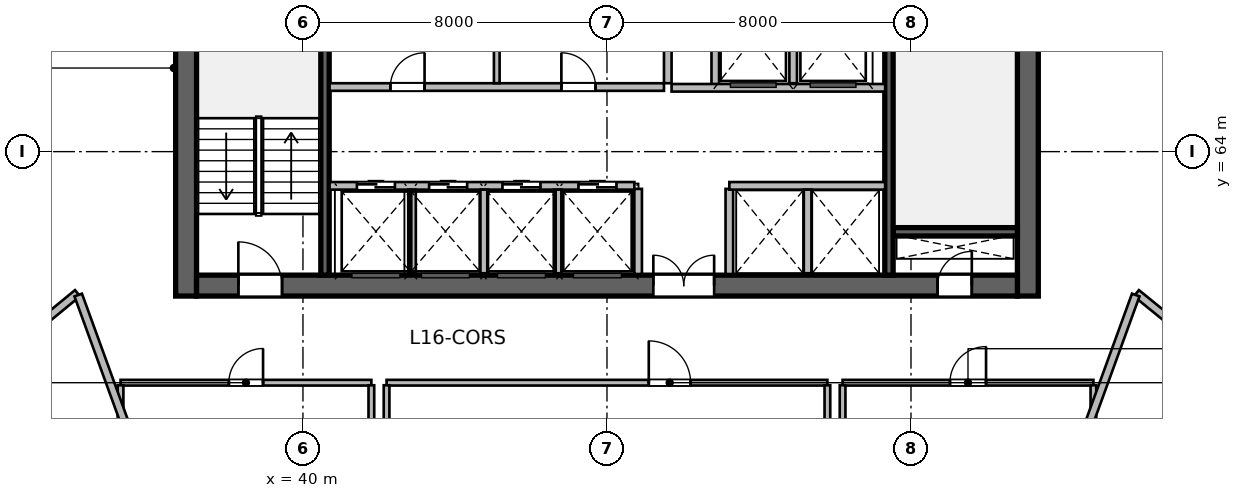
"""IFC4 building model, lengths in metres.
Left out: names, types, materials, properties, quantities, classifications, styles, units other than length and angle.
Written with IfcOpenShell. Run it as: python <this file> out.ifc"""

import sys

from ifc_helpers import new_model, si_unit, direction, frame, frame_2d, origin, place, context, subcontext, project, spatial, rectangle, extrude, source, transform, mapped, element, fill, save


model = new_model("IFC4")
c1 = context("Model", 3, precision=1e-05, world=origin(), true_north=direction((0.0, 1.0)))
c2 = subcontext(c1, "Body", "Model", "MODEL_VIEW")
j1 = project(units=[si_unit("LENGTHUNIT", "METRE"), si_unit("PLANEANGLEUNIT", "RADIAN")], contexts=[c1])
p1 = place(None, origin())
s1 = spatial("IfcSite", under=j1, at=p1, CompositionType="ELEMENT")
p2 = place(p1, origin())
s2 = spatial("IfcBuilding", under=s1, at=p2, CompositionType="ELEMENT")
p3 = place(p2, frame((0.0, 0.0, 71.4)))
s3 = spatial("IfcBuildingStorey", under=s2, at=p3, CompositionType="ELEMENT", Elevation=71.4)
m1 = source(origin(), c2, "Body", "SweptSolid", [
    extrude(rectangle(XDim=12.0, YDim=0.55, at=frame_2d((6.0, 0.0))), origin(), (0.0, 0.0, 1.0), 3.6),
])
for number, where, z_axis, x_axis in (
    (1, (36.925, 60.2, 0.0), (0.0, 0.0, 1.0), (0.0, 1.0, 0.0)),
    (2, (59.075, 60.2, 0.0), (0.0, 0.0, 1.0), (0.0, 1.0, 0.0)),
):
    element("IfcWall", number, at=place(p3, frame(where, z_axis=z_axis, x_axis=x_axis)), inside=s3, PredefinedType="SHEAR", context=c2, shape_type="MappedRepresentation", body=[
        mapped(m1, transform((0.0, 0.0, 0.0), scale=1.0)),
    ])
m2 = source(origin(), c2, "Body", "SweptSolid", [
    extrude(rectangle(XDim=21.6, YDim=0.55, at=frame_2d((10.8, 0.0))), origin(), (0.0, 0.0, 1.0), 3.6),
])
p4 = place(p3, frame((37.2, 60.475, 0.0), z_axis=(0.0, 0.0, 1.0), x_axis=(1.0, 0.0, 0.0)))
e3 = element("IfcWall", 3, at=p4, inside=s3, PredefinedType="SHEAR", context=c2, shape_type="MappedRepresentation", body=[
    mapped(m2, transform((0.0, 0.0, 0.0), scale=1.0)),
])
p5 = place(p4, frame((1.1, 0.0, 0.0)))
e4 = element("IfcOpeningElement", 4, at=p5, cuts=e3, PredefinedType="OPENING", context=c2, shape_type="SweptSolid", body=[
    extrude(rectangle(XDim=1.15, YDim=2.15, at=frame_2d((0.575, 1.075))), frame((0.0, 0.285, 0.0), z_axis=(0.0, -1.0, 0.0), x_axis=(1.0, 0.0, 0.0)), (0.0, 0.0, 1.0), 0.57),
])
p6 = place(p4, frame((19.5, 0.0, 0.0)))
e5 = element("IfcOpeningElement", 5, at=p6, cuts=e3, PredefinedType="OPENING", context=c2, shape_type="SweptSolid", body=[
    extrude(rectangle(XDim=0.9, YDim=2.1, at=frame_2d((0.45, 1.05))), frame((0.0, 0.285, 0.0), z_axis=(0.0, -1.0, 0.0), x_axis=(1.0, 0.0, 0.0)), (0.0, 0.0, 1.0), 0.57),
])
p7 = place(p4, frame((12.02, 0.0, 0.0)))
e6 = element("IfcOpeningElement", 6, at=p7, cuts=e3, PredefinedType="OPENING", context=c2, shape_type="SweptSolid", body=[
    extrude(rectangle(XDim=1.6, YDim=2.15, at=frame_2d((0.8, 1.075))), frame((0.0, 0.285, 0.0), z_axis=(0.0, -1.0, 0.0), x_axis=(1.0, 0.0, 0.0)), (0.0, 0.0, 1.0), 0.57),
])
m3 = source(origin(), c2, "Body", "SweptSolid", [
    extrude(rectangle(XDim=3.27, YDim=0.22, at=frame_2d((1.635, 0.0))), origin(), (0.0, 0.0, 1.0), 3.6),
])
p8 = place(p3, frame((55.53, 61.89, 0.0), z_axis=(0.0, 0.0, 1.0), x_axis=(1.0, 0.0, 0.0)))
e7 = element("IfcWall", 7, at=p8, inside=s3, PredefinedType="SHEAR", context=c2, shape_type="MappedRepresentation", body=[
    mapped(m3, transform((0.0, 0.0, 0.0), scale=1.0)),
])
m4 = source(origin(), c2, "Body", "SweptSolid", [
    extrude(rectangle(XDim=10.9, YDim=0.22, at=frame_2d((5.45, 0.0))), origin(), (0.0, 0.0, 1.0), 3.6),
])
p9 = place(p3, frame((40.58, 60.75, 0.0), z_axis=(0.0, 0.0, 1.0), x_axis=(0.0, 1.0, 0.0)))
e8 = element("IfcWall", 8, at=p9, inside=s3, PredefinedType="SHEAR", context=c2, shape_type="MappedRepresentation", body=[
    mapped(m4, transform((0.0, 0.0, 0.0), scale=1.0)),
])
p10 = place(p3, frame((55.42, 60.75, 0.0), z_axis=(0.0, 0.0, 1.0), x_axis=(0.0, 1.0, 0.0)))
e9 = element("IfcWall", 9, at=p10, inside=s3, PredefinedType="SHEAR", context=c2, shape_type="MappedRepresentation", body=[
    mapped(m4, transform((0.0, 0.0, 0.0), scale=1.0)),
])
p11 = place(p10, frame((9.495, 0.0, 0.0)))
e10 = element("IfcOpeningElement", 10, at=p11, cuts=e9, PredefinedType="OPENING", context=c2, shape_type="SweptSolid", body=[
    extrude(rectangle(XDim=1.15, YDim=2.15, at=frame_2d((0.575, 1.075))), frame((0.0, 0.12, 0.0), z_axis=(0.0, -1.0, 0.0), x_axis=(1.0, 0.0, 0.0)), (0.0, 0.0, 1.0), 0.24),
])
m5 = source(origin(), c2, "Body", "SweptSolid", [
    extrude(rectangle(XDim=2.24, YDim=0.2, at=frame_2d((1.12, 0.0))), origin(), (0.0, 0.0, 1.0), 3.36),
])
for number, where, z_axis, x_axis in (
    (11, (48.82, 60.78, 0.0), (0.0, 0.0, 1.0), (0.0, 1.0, 0.0)),
    (12, (51.22, 60.78, 0.0), (0.0, 0.0, 1.0), (0.0, 1.0, 0.0)),
):
    element("IfcWall", number, at=place(p3, frame(where, z_axis=z_axis, x_axis=x_axis)), inside=s3, PredefinedType="SOLIDWALL", context=c2, shape_type="MappedRepresentation", body=[
        mapped(m5, transform((0.0, 0.0, 0.0), scale=1.0)),
    ])
m6 = source(origin(), c2, "Body", "SweptSolid", [
    extrude(rectangle(XDim=5.8, YDim=0.2, at=frame_2d((2.9, 0.0))), origin(), (0.0, 0.0, 1.0), 3.36),
])
p12 = place(p3, frame((49.6, 65.8, 0.0), z_axis=(0.0, 0.0, 1.0), x_axis=(0.0, 1.0, 0.0)))
e13 = element("IfcWall", 13, at=p12, inside=s3, PredefinedType="SOLIDWALL", context=c2, shape_type="MappedRepresentation", body=[
    mapped(m6, transform((0.0, 0.0, 0.0), scale=1.0)),
])
m7 = source(origin(), c2, "Body", "SweptSolid", [
    extrude(rectangle(XDim=2.58, YDim=0.2, at=frame_2d((1.29, 0.0))), origin(), (0.0, 0.0, 1.0), 3.36),
])
p13 = place(p3, frame((50.85, 65.68, 0.0), z_axis=(0.0, 0.0, 1.0), x_axis=(0.0, 1.0, 0.0)))
e14 = element("IfcWall", 14, at=p13, inside=s3, PredefinedType="SOLIDWALL", context=c2, shape_type="MappedRepresentation", body=[
    mapped(m7, transform((0.0, 0.0, 0.0), scale=1.0)),
])
m8 = source(origin(), c2, "Body", "SweptSolid", [
    extrude(rectangle(XDim=2.4, YDim=0.2, at=frame_2d((1.2, 0.0))), origin(), (0.0, 0.0, 1.0), 3.36),
])
p14 = place(p3, frame((52.9, 65.8, 0.0), z_axis=(0.0, 0.0, 1.0), x_axis=(0.0, 1.0, 0.0)))
e15 = element("IfcWall", 15, at=p14, inside=s3, PredefinedType="SOLIDWALL", context=c2, shape_type="MappedRepresentation", body=[
    mapped(m8, transform((0.0, 0.0, 0.0), scale=1.0)),
])
m9 = source(origin(), c2, "Body", "SweptSolid", [
    extrude(rectangle(XDim=5.62, YDim=0.2, at=frame_2d((2.81, 0.0))), origin(), (0.0, 0.0, 1.0), 3.36),
])
p15 = place(p3, frame((49.7, 65.68, 0.0), z_axis=(0.0, 0.0, 1.0), x_axis=(1.0, 0.0, 0.0)))
e16 = element("IfcWall", 16, at=p15, inside=s3, PredefinedType="SOLIDWALL", context=c2, shape_type="MappedRepresentation", body=[
    mapped(m9, transform((0.0, 0.0, 0.0), scale=1.0)),
])
m10 = source(origin(), c2, "Body", "SweptSolid", [
    extrude(rectangle(XDim=8.02, YDim=0.2, at=frame_2d((4.01, 0.0))), origin(), (0.0, 0.0, 1.0), 3.36),
])
p16 = place(p3, frame((40.7, 63.1, 0.0), z_axis=(0.0, 0.0, 1.0), x_axis=(1.0, 0.0, 0.0)))
e17 = element("IfcWall", 17, at=p16, inside=s3, PredefinedType="SOLIDWALL", context=c2, shape_type="MappedRepresentation", body=[
    mapped(m10, transform((0.0, 0.0, 0.0), scale=1.0)),
])
p17 = place(p16, frame((0.72, 0.0, 0.0)))
e18 = element("IfcOpeningElement", 18, at=p17, cuts=e17, PredefinedType="OPENING", context=c2, shape_type="SweptSolid", body=[
    extrude(rectangle(XDim=1.0, YDim=2.15, at=frame_2d((0.5, 1.075))), frame((0.0, 0.11, 0.0), z_axis=(0.0, -1.0, 0.0), x_axis=(1.0, 0.0, 0.0)), (0.0, 0.0, 1.0), 0.22),
])
p18 = place(p16, frame((2.62, 0.0, 0.0)))
e19 = element("IfcOpeningElement", 19, at=p18, cuts=e17, PredefinedType="OPENING", context=c2, shape_type="SweptSolid", body=[
    extrude(rectangle(XDim=1.0, YDim=2.15, at=frame_2d((0.5, 1.075))), frame((0.0, 0.11, 0.0), z_axis=(0.0, -1.0, 0.0), x_axis=(1.0, 0.0, 0.0)), (0.0, 0.0, 1.0), 0.22),
])
p19 = place(p16, frame((4.55, 0.0, 0.0)))
e20 = element("IfcOpeningElement", 20, at=p19, cuts=e17, PredefinedType="OPENING", context=c2, shape_type="SweptSolid", body=[
    extrude(rectangle(XDim=1.0, YDim=2.15, at=frame_2d((0.5, 1.075))), frame((0.0, 0.11, 0.0), z_axis=(0.0, -1.0, 0.0), x_axis=(1.0, 0.0, 0.0)), (0.0, 0.0, 1.0), 0.22),
])
p20 = place(p16, frame((6.55, 0.0, 0.0)))
e21 = element("IfcOpeningElement", 21, at=p20, cuts=e17, PredefinedType="OPENING", context=c2, shape_type="SweptSolid", body=[
    extrude(rectangle(XDim=1.0, YDim=2.15, at=frame_2d((0.5, 1.075))), frame((0.0, 0.11, 0.0), z_axis=(0.0, -1.0, 0.0), x_axis=(1.0, 0.0, 0.0)), (0.0, 0.0, 1.0), 0.22),
])
m11 = source(origin(), c2, "Body", "SweptSolid", [
    extrude(rectangle(XDim=4.1, YDim=0.2, at=frame_2d((2.05, 0.0))), origin(), (0.0, 0.0, 1.0), 3.36),
])
p21 = place(p3, frame((51.22, 63.1, 0.0), z_axis=(0.0, 0.0, 1.0), x_axis=(1.0, 0.0, 0.0)))
e22 = element("IfcWall", 22, at=p21, inside=s3, PredefinedType="SOLIDWALL", context=c2, shape_type="MappedRepresentation", body=[
    mapped(m11, transform((0.0, 0.0, 0.0), scale=1.0)),
])
m12 = source(origin(), c2, "Body", "SweptSolid", [
    extrude(rectangle(XDim=2.2, YDim=0.2, at=frame_2d((1.1, 0.0))), origin(), (0.0, 0.0, 1.0), 3.36),
])
for number, where, z_axis, x_axis in (
    (23, (42.87, 60.8, 0.0), (0.0, 0.0, 1.0), (0.0, 1.0, 0.0)),
    (24, (44.77, 60.8, 0.0), (0.0, 0.0, 1.0), (0.0, 1.0, 0.0)),
    (25, (46.7, 60.8, 0.0), (0.0, 0.0, 1.0), (0.0, 1.0, 0.0)),
    (26, (53.28, 60.8, 0.0), (0.0, 0.0, 1.0), (0.0, 1.0, 0.0)),
):
    element("IfcWall", number, at=place(p3, frame(where, z_axis=z_axis, x_axis=x_axis)), inside=s3, PredefinedType="SOLIDWALL", context=c2, shape_type="MappedRepresentation", body=[
        mapped(m12, transform((0.0, 0.0, 0.0), scale=1.0)),
    ])
m13 = source(origin(), c2, "Body", "SweptSolid", [
    extrude(rectangle(XDim=8.8, YDim=0.2, at=frame_2d((4.4, 0.0))), origin(), (0.0, 0.0, 1.0), 3.36),
])
p22 = place(p3, frame((40.7, 65.7, 0.0), z_axis=(0.0, 0.0, 1.0), x_axis=(1.0, 0.0, 0.0)))
e27 = element("IfcWall", 27, at=p22, inside=s3, PredefinedType="SOLIDWALL", context=c2, shape_type="MappedRepresentation", body=[
    mapped(m13, transform((0.0, 0.0, 0.0), scale=1.0)),
])
p23 = place(p22, frame((1.6, 0.0, 0.0)))
e28 = element("IfcOpeningElement", 28, at=p23, cuts=e27, PredefinedType="OPENING", context=c2, shape_type="SweptSolid", body=[
    extrude(rectangle(XDim=0.9, YDim=2.1, at=frame_2d((0.45, 1.05))), frame((0.0, 0.11, 0.0), z_axis=(0.0, -1.0, 0.0), x_axis=(1.0, 0.0, 0.0)), (0.0, 0.0, 1.0), 0.22),
])
p24 = place(p22, frame((6.1, 0.0, 0.0)))
e29 = element("IfcOpeningElement", 29, at=p24, cuts=e27, PredefinedType="OPENING", context=c2, shape_type="SweptSolid", body=[
    extrude(rectangle(XDim=0.9, YDim=2.1, at=frame_2d((0.45, 1.05))), frame((0.0, 0.11, 0.0), z_axis=(0.0, -1.0, 0.0), x_axis=(1.0, 0.0, 0.0)), (0.0, 0.0, 1.0), 0.22),
])
m14 = source(origin(), c2, "Body", "SweptSolid", [
    extrude(rectangle(XDim=2.4, YDim=0.15, at=frame_2d((1.2, 0.0))), origin(), (0.0, 0.0, 1.0), 3.36),
])
p25 = place(p3, frame((45.1, 65.8, 0.0), z_axis=(0.0, 0.0, 1.0), x_axis=(0.0, 1.0, 0.0)))
e30 = element("IfcWall", 30, at=p25, inside=s3, PredefinedType="PARTITIONING", context=c2, shape_type="MappedRepresentation", body=[
    mapped(m14, transform((0.0, 0.0, 0.0), scale=1.0)),
])
m15 = source(origin(), c2, "Body", "SweptSolid", [
    extrude(rectangle(XDim=6.6, YDim=0.15, at=frame_2d((3.3, 0.0))), origin(), (0.0, 0.0, 1.0), 3.36),
])
p26 = place(p3, frame((35.2, 57.92, 0.0), z_axis=(0.0, 0.0, 1.0), x_axis=(1.0, 0.0, 0.0)))
e31 = element("IfcWall", 31, at=p26, inside=s3, PredefinedType="PARTITIONING", context=c2, shape_type="MappedRepresentation", body=[
    mapped(m15, transform((0.0, 0.0, 0.0), scale=1.0)),
])
p27 = place(p26, frame((2.85, 0.0, 0.0)))
e32 = element("IfcOpeningElement", 32, at=p27, cuts=e31, PredefinedType="OPENING", context=c2, shape_type="SweptSolid", body=[
    extrude(rectangle(XDim=0.9, YDim=2.1, at=frame_2d((0.45, 1.05))), frame((0.0, 0.085, 0.0), z_axis=(0.0, -1.0, 0.0), x_axis=(1.0, 0.0, 0.0)), (0.0, 0.0, 1.0), 0.17),
])
m16 = source(origin(), c2, "Body", "SweptSolid", [
    extrude(rectangle(XDim=3.785, YDim=0.15, at=frame_2d((1.893, 0.0))), origin(), (0.0, 0.0, 1.0), 3.36),
])
for number, where, z_axis, x_axis in (
    (33, (35.2, 54.067, 0.0), (0.0, 0.0, 1.0), (0.0, 1.0, 0.0)),
    (34, (41.8, 54.067, 0.0), (0.0, 0.0, 1.0), (0.0, 1.0, 0.0)),
):
    element("IfcWall", number, at=place(p3, frame(where, z_axis=z_axis, x_axis=x_axis)), inside=s3, PredefinedType="PARTITIONING", context=c2, shape_type="MappedRepresentation", body=[
        mapped(m16, transform((0.0, 0.0, 0.0), scale=1.0)),
    ])
m17 = source(origin(), c2, "Body", "SweptSolid", [
    extrude(rectangle(XDim=11.6, YDim=0.15, at=frame_2d((5.8, 0.0))), origin(), (0.0, 0.0, 1.0), 3.36),
])
p28 = place(p3, frame((42.2, 57.92, 0.0), z_axis=(0.0, 0.0, 1.0), x_axis=(1.0, 0.0, 0.0)))
e35 = element("IfcWall", 35, at=p28, inside=s3, PredefinedType="PARTITIONING", context=c2, shape_type="MappedRepresentation", body=[
    mapped(m17, transform((0.0, 0.0, 0.0), scale=1.0)),
])
p29 = place(p28, frame((6.9, 0.0, 0.0)))
e36 = element("IfcOpeningElement", 36, at=p29, cuts=e35, PredefinedType="OPENING", context=c2, shape_type="SweptSolid", body=[
    extrude(rectangle(XDim=1.1, YDim=2.15, at=frame_2d((0.55, 1.075))), frame((0.0, 0.085, 0.0), z_axis=(0.0, -1.0, 0.0), x_axis=(1.0, 0.0, 0.0)), (0.0, 0.0, 1.0), 0.17),
])
for number, where, z_axis, x_axis in (
    (37, (42.2, 54.067, 0.0), (0.0, 0.0, 1.0), (0.0, 1.0, 0.0)),
    (38, (53.8, 54.067, 0.0), (0.0, 0.0, 1.0), (0.0, 1.0, 0.0)),
):
    element("IfcWall", number, at=place(p3, frame(where, z_axis=z_axis, x_axis=x_axis)), inside=s3, PredefinedType="PARTITIONING", context=c2, shape_type="MappedRepresentation", body=[
        mapped(m16, transform((0.0, 0.0, 0.0), scale=1.0)),
    ])
p30 = place(p3, frame((54.2, 57.92, 0.0), z_axis=(0.0, 0.0, 1.0), x_axis=(1.0, 0.0, 0.0)))
e39 = element("IfcWall", 39, at=p30, inside=s3, PredefinedType="PARTITIONING", context=c2, shape_type="MappedRepresentation", body=[
    mapped(m15, transform((0.0, 0.0, 0.0), scale=1.0)),
])
p31 = place(p30, frame((2.825, 0.0, 0.0)))
e40 = element("IfcOpeningElement", 40, at=p31, cuts=e39, PredefinedType="OPENING", context=c2, shape_type="SweptSolid", body=[
    extrude(rectangle(XDim=0.95, YDim=2.1, at=frame_2d((0.475, 1.05))), frame((0.0, 0.085, 0.0), z_axis=(0.0, -1.0, 0.0), x_axis=(1.0, 0.0, 0.0)), (0.0, 0.0, 1.0), 0.17),
])
for number, where, z_axis, x_axis in (
    (41, (54.2, 54.067, 0.0), (0.0, 0.0, 1.0), (0.0, 1.0, 0.0)),
    (42, (60.8, 54.067, 0.0), (0.0, 0.0, 1.0), (0.0, 1.0, 0.0)),
):
    element("IfcWall", number, at=place(p3, frame(where, z_axis=z_axis, x_axis=x_axis)), inside=s3, PredefinedType="PARTITIONING", context=c2, shape_type="MappedRepresentation", body=[
        mapped(m16, transform((0.0, 0.0, 0.0), scale=1.0)),
    ])
m18 = source(origin(), c2, "Body", "SweptSolid", [
    extrude(rectangle(XDim=6.721, YDim=0.21, at=frame_2d((3.361, 0.0))), origin(), (0.0, 0.0, 1.0), 3.36),
])
p32 = place(p3, frame((28.874, 56.01, 0.0), z_axis=(0.0, 0.0, 1.0), x_axis=(0.772828051199, 0.63461547671, 0.0)))
e43 = element("IfcWall", 43, at=p32, inside=s3, PredefinedType="PARTITIONING", context=c2, shape_type="MappedRepresentation", body=[
    mapped(m18, transform((0.0, 0.0, 0.0), scale=1.0)),
])
m19 = source(origin(), c2, "Body", "SweptSolid", [
    extrude(rectangle(XDim=12.196, YDim=0.21, at=frame_2d((6.098, 0.0))), origin(), (0.0, 0.0, 1.0), 3.36),
])
p33 = place(p3, frame((38.258, 48.766, 0.0), z_axis=(0.0, 0.0, 1.0), x_axis=(-0.342022711534, 0.939691686031, 0.0)))
e44 = element("IfcWall", 44, at=p33, inside=s3, PredefinedType="PARTITIONING", context=c2, shape_type="MappedRepresentation", body=[
    mapped(m19, transform((0.0, 0.0, 0.0), scale=1.0)),
])
m20 = source(origin(), c2, "Body", "SweptSolid", [
    extrude(rectangle(XDim=6.408, YDim=0.21, at=frame_2d((3.204, 0.0))), origin(), (0.0, 0.0, 1.0), 3.36),
])
p34 = place(p3, frame((61.931, 60.275, 0.0), z_axis=(0.0, 0.0, 1.0), x_axis=(0.775878552904, -0.630882295792, 0.0)))
e45 = element("IfcWall", 45, at=p34, inside=s3, PredefinedType="PARTITIONING", context=c2, shape_type="MappedRepresentation", body=[
    mapped(m20, transform((0.0, 0.0, 0.0), scale=1.0)),
])
p35 = place(p34, frame((1.063, 0.0, 0.0)))
e46 = element("IfcOpeningElement", 46, at=p35, cuts=e45, PredefinedType="OPENING", context=c2, shape_type="SweptSolid", body=[
    extrude(rectangle(XDim=0.95, YDim=2.15, at=frame_2d((0.475, 1.075))), frame((0.0, 0.115, 0.0), z_axis=(0.0, -1.0, 0.0), x_axis=(1.0, 0.0, 0.0)), (0.0, 0.0, 1.0), 0.23),
])
p36 = place(p3, frame((57.742, 48.766, 0.0), z_axis=(0.0, 0.0, 1.0), x_axis=(0.342022711534, 0.939691686031, 0.0)))
e47 = element("IfcWall", 47, at=p36, inside=s3, PredefinedType="PARTITIONING", context=c2, shape_type="MappedRepresentation", body=[
    mapped(m19, transform((0.0, 0.0, 0.0), scale=1.0)),
])
m21 = source(origin(), c2, "Body", "SweptSolid", [
    extrude(rectangle(XDim=1.15, YDim=2.15, at=frame_2d((0.575, 1.075))), frame((0.0, 0.025, 0.0), z_axis=(0.0, -1.0, 0.0), x_axis=(1.0, 0.0, 0.0)), (0.0, 0.0, 1.0), 0.05),
])
p37 = place(p5, origin())
e48 = element("IfcDoor", 48, at=p37, inside=s3, OperationType="SINGLE_SWING_LEFT", PredefinedType="DOOR", context=c2, shape_type="MappedRepresentation", body=[
    mapped(m21, transform((0.0, 0.0, 0.0), scale=1.0)),
])
fill(e4, e48)
m22 = source(origin(), c2, "Body", "SweptSolid", [
    extrude(rectangle(XDim=0.9, YDim=2.1, at=frame_2d((0.45, 1.05))), frame((0.0, 0.025, 0.0), z_axis=(0.0, -1.0, 0.0), x_axis=(1.0, 0.0, 0.0)), (0.0, 0.0, 1.0), 0.05),
])
p38 = place(p6, origin())
e49 = element("IfcDoor", 49, at=p38, inside=s3, OperationType="SINGLE_SWING_RIGHT", PredefinedType="DOOR", context=c2, shape_type="MappedRepresentation", body=[
    mapped(m22, transform((0.0, 0.0, 0.0), scale=1.0)),
])
fill(e5, e49)
m23 = source(origin(), c2, "Body", "SweptSolid", [
    extrude(rectangle(XDim=1.6, YDim=2.15, at=frame_2d((0.8, 1.075))), frame((0.0, 0.025, 0.0), z_axis=(0.0, -1.0, 0.0), x_axis=(1.0, 0.0, 0.0)), (0.0, 0.0, 1.0), 0.05),
])
p39 = place(p7, origin())
e50 = element("IfcDoor", 50, at=p39, inside=s3, OperationType="DOUBLE_DOOR_SINGLE_SWING", PredefinedType="DOOR", context=c2, shape_type="MappedRepresentation", body=[
    mapped(m23, transform((0.0, 0.0, 0.0), scale=1.0)),
])
fill(e6, e50)
m24 = source(origin(), c2, "Body", "SweptSolid", [
    extrude(rectangle(XDim=1.0, YDim=2.15, at=frame_2d((0.5, 1.075))), frame((0.0, 0.025, 0.0), z_axis=(0.0, -1.0, 0.0), x_axis=(1.0, 0.0, 0.0)), (0.0, 0.0, 1.0), 0.05),
])
p40 = place(p17, origin())
e51 = element("IfcDoor", 51, at=p40, inside=s3, OperationType="DOUBLE_DOOR_SLIDING", PredefinedType="DOOR", context=c2, shape_type="MappedRepresentation", body=[
    mapped(m24, transform((0.0, 0.0, 0.0), scale=1.0)),
])
fill(e18, e51)
p41 = place(p18, origin())
e52 = element("IfcDoor", 52, at=p41, inside=s3, OperationType="DOUBLE_DOOR_SLIDING", PredefinedType="DOOR", context=c2, shape_type="MappedRepresentation", body=[
    mapped(m24, transform((0.0, 0.0, 0.0), scale=1.0)),
])
fill(e19, e52)
p42 = place(p19, origin())
e53 = element("IfcDoor", 53, at=p42, inside=s3, OperationType="DOUBLE_DOOR_SLIDING", PredefinedType="DOOR", context=c2, shape_type="MappedRepresentation", body=[
    mapped(m24, transform((0.0, 0.0, 0.0), scale=1.0)),
])
fill(e20, e53)
p43 = place(p20, origin())
e54 = element("IfcDoor", 54, at=p43, inside=s3, OperationType="DOUBLE_DOOR_SLIDING", PredefinedType="DOOR", context=c2, shape_type="MappedRepresentation", body=[
    mapped(m24, transform((0.0, 0.0, 0.0), scale=1.0)),
])
fill(e21, e54)
p44 = place(p23, origin())
e55 = element("IfcDoor", 55, at=p44, inside=s3, OperationType="SINGLE_SWING_RIGHT", PredefinedType="DOOR", context=c2, shape_type="MappedRepresentation", body=[
    mapped(m22, transform((0.0, 0.0, 0.0), scale=1.0)),
])
fill(e28, e55)
p45 = place(p24, origin())
e56 = element("IfcDoor", 56, at=p45, inside=s3, OperationType="SINGLE_SWING_LEFT", PredefinedType="DOOR", context=c2, shape_type="MappedRepresentation", body=[
    mapped(m22, transform((0.0, 0.0, 0.0), scale=1.0)),
])
fill(e29, e56)
p46 = place(p27, origin())
e57 = element("IfcDoor", 57, at=p46, inside=s3, OperationType="SINGLE_SWING_RIGHT", PredefinedType="DOOR", context=c2, shape_type="MappedRepresentation", body=[
    mapped(m22, transform((0.0, 0.0, 0.0), scale=1.0)),
])
fill(e32, e57)
m25 = source(origin(), c2, "Body", "SweptSolid", [
    extrude(rectangle(XDim=1.1, YDim=2.15, at=frame_2d((0.55, 1.075))), frame((0.0, 0.025, 0.0), z_axis=(0.0, -1.0, 0.0), x_axis=(1.0, 0.0, 0.0)), (0.0, 0.0, 1.0), 0.05),
])
p47 = place(p29, origin())
e58 = element("IfcDoor", 58, at=p47, inside=s3, OperationType="SINGLE_SWING_LEFT", PredefinedType="DOOR", context=c2, shape_type="MappedRepresentation", body=[
    mapped(m25, transform((0.0, 0.0, 0.0), scale=1.0)),
])
fill(e36, e58)
m26 = source(origin(), c2, "Body", "SweptSolid", [
    extrude(rectangle(XDim=0.95, YDim=2.1, at=frame_2d((0.475, 1.05))), frame((0.0, 0.025, 0.0), z_axis=(0.0, -1.0, 0.0), x_axis=(1.0, 0.0, 0.0)), (0.0, 0.0, 1.0), 0.05),
])
p48 = place(p31, origin())
e59 = element("IfcDoor", 59, at=p48, inside=s3, OperationType="SINGLE_SWING_RIGHT", PredefinedType="DOOR", context=c2, shape_type="MappedRepresentation", body=[
    mapped(m26, transform((0.0, 0.0, 0.0), scale=1.0)),
])
fill(e40, e59)
save(model, sys.argv[1])
